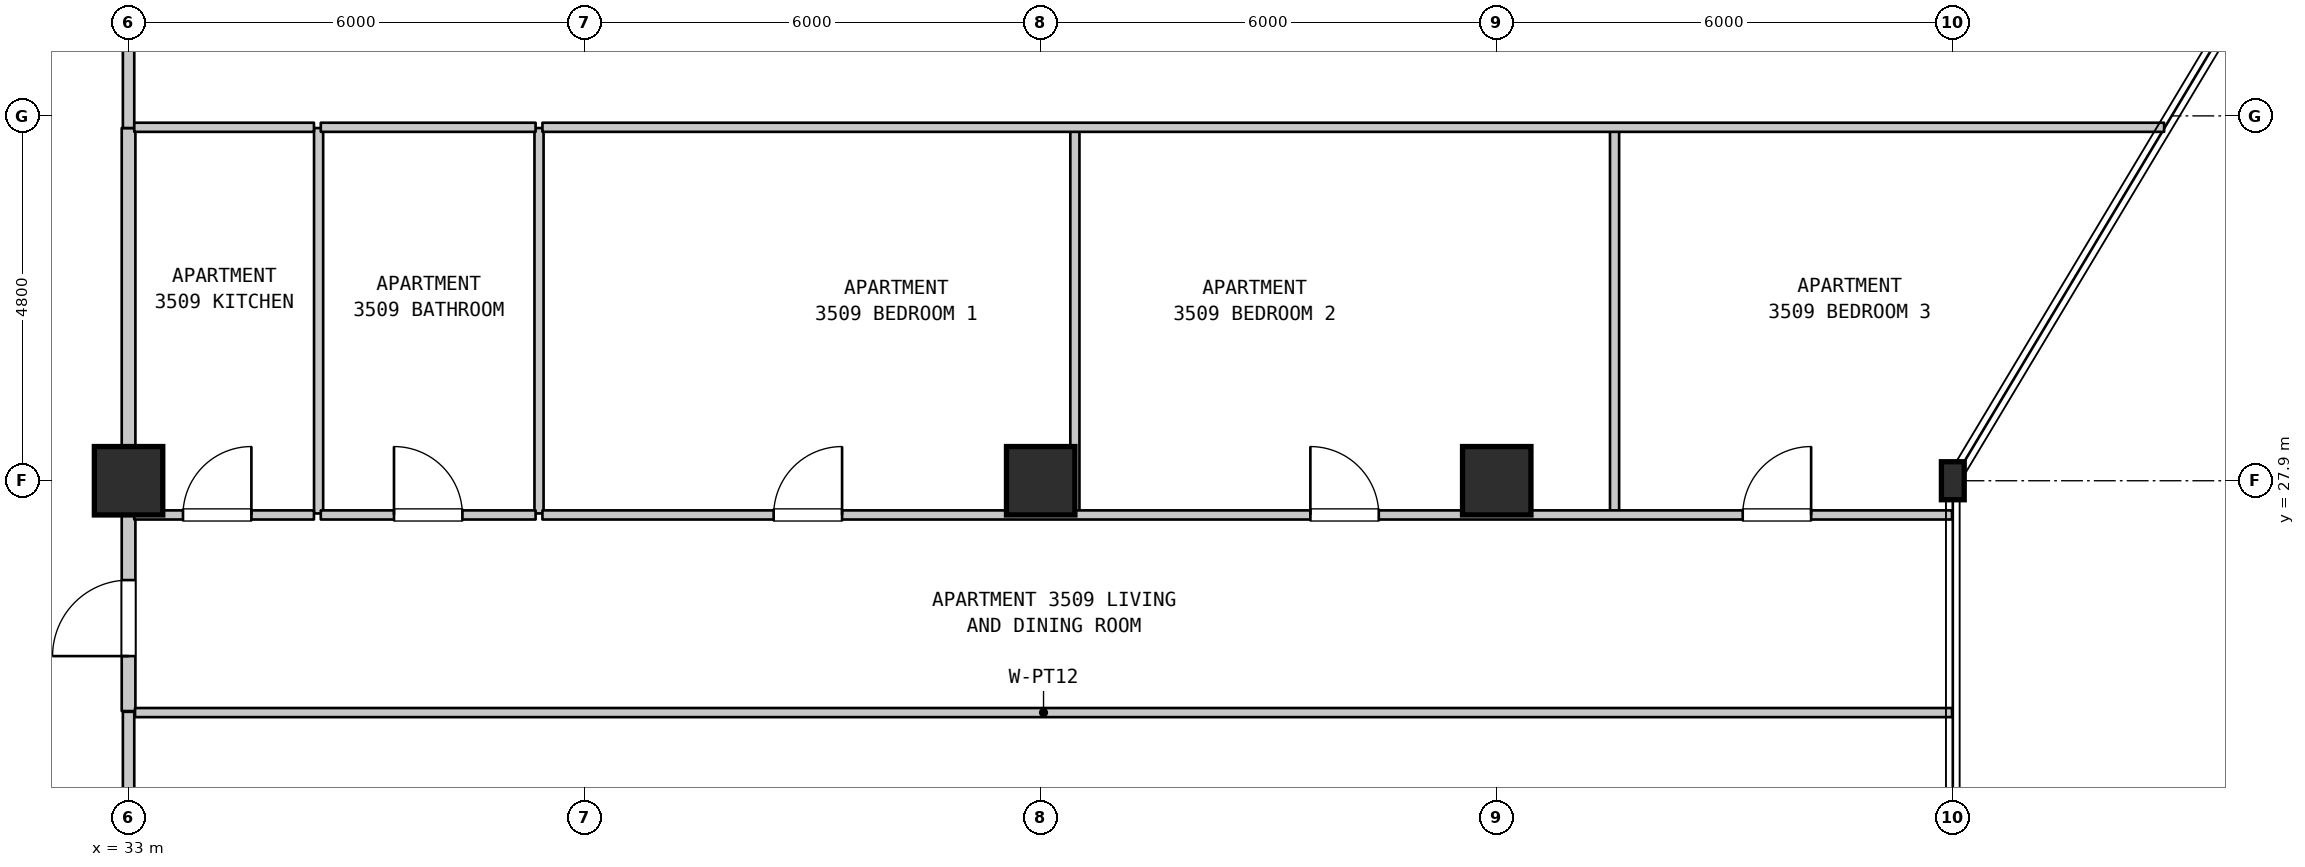
"""IFC4 building model, lengths in metres.
Left out: names, types, materials, properties, quantities, classifications, styles, units other than length and angle.
Written with IfcOpenShell. Run it as: python <this file> out.ifc"""

import sys

from ifc_helpers import new_model, si_unit, direction, frame, frame_2d, origin, origin_2d, place, context, subcontext, project, spatial, rectangle, i_section, extrude, element, fill, save


model = new_model("IFC4")
c1 = context("Model", 3, precision=1e-05, world=origin(), true_north=direction((0.0, 1.0)))
c2 = subcontext(c1, "Body", "Model", "MODEL_VIEW")
j1 = project(units=[si_unit("LENGTHUNIT", "METRE"), si_unit("PLANEANGLEUNIT", "RADIAN")], contexts=[c1])
p1 = place(None, origin())
s1 = spatial("IfcSite", under=j1, at=p1, CompositionType="ELEMENT")
p2 = place(p1, origin())
s2 = spatial("IfcBuilding", under=s1, at=p2, CompositionType="ELEMENT")
p3 = place(p2, frame((0.0, 0.0, 144.6)))
s3 = spatial("IfcBuildingStorey", under=s2, at=p3, CompositionType="ELEMENT", Elevation=144.6)
for number, where, z_axis, x_axis in (
    (1, (33.0, 27.9, 0.0), (0.0, 0.0, 1.0), (1.0, 0.0, 0.0)),
    (2, (45.0, 27.9, 0.0), (0.0, 0.0, 1.0), (1.0, 0.0, 0.0)),
    (3, (51.0, 27.9, 0.0), (0.0, 0.0, 1.0), (1.0, 0.0, 0.0)),
):
    element("IfcColumn", number, at=place(p3, frame(where, z_axis=z_axis, x_axis=x_axis)), inside=s3, PredefinedType="COLUMN", context=c2, shape_type="SweptSolid", body=[
        extrude(rectangle(XDim=0.9, YDim=0.9, at=origin_2d()), origin(), (0.0, 0.0, 1.0), 3.7),
    ])
p4 = place(p3, frame((57.0, 27.9, 0.0), z_axis=(0.0, 0.0, 1.0), x_axis=(1.0, 0.0, 0.0)))
e4 = element("IfcColumn", 4, at=p4, inside=s3, PredefinedType="COLUMN", context=c2, shape_type="SweptSolid", body=[
    extrude(i_section(OverallWidth=0.3, OverallDepth=0.5, WebThickness=0.014, FlangeThickness=0.028, FilletRadius=0.027, at=origin_2d()), origin(), (0.0, 0.0, 1.0), 3.7),
])
p5 = place(p3, frame((33.0, 19.51, 0.0), z_axis=(0.0, 0.0, 1.0), x_axis=(0.0, 1.0, 0.0)))
e5 = element("IfcWall", 5, at=p5, inside=s3, PredefinedType="STANDARD", context=c2, shape_type="SweptSolid", body=[
    extrude(rectangle(XDim=5.35, YDim=0.15, at=frame_2d((2.675, 0.0))), origin(), (0.0, 0.0, 1.0), 2.935),
])
p6 = place(p5, frame((1.534, 0.0, 0.0)))
e6 = element("IfcOpeningElement", 6, at=p6, cuts=e5, PredefinedType="OPENING", context=c2, shape_type="SweptSolid", body=[
    extrude(rectangle(XDim=1.0, YDim=2.15, at=frame_2d((0.5, 1.075))), frame((0.0, 0.085, 0.0), z_axis=(0.0, -1.0, 0.0), x_axis=(1.0, 0.0, 0.0)), (0.0, 0.0, 1.0), 0.17),
])
p7 = place(p3, frame((33.0, 24.87, 0.0), z_axis=(0.0, 0.0, 1.0), x_axis=(0.0, 1.0, 0.0)))
e7 = element("IfcWall", 7, at=p7, inside=s3, PredefinedType="STANDARD", context=c2, shape_type="SweptSolid", body=[
    extrude(rectangle(XDim=2.6, YDim=0.18, at=frame_2d((1.3, 0.0))), origin(), (0.0, 0.0, 1.0), 2.935),
])
p8 = place(p7, frame((0.723, 0.0, 0.0)))
e8 = element("IfcOpeningElement", 8, at=p8, cuts=e7, PredefinedType="OPENING", context=c2, shape_type="SweptSolid", body=[
    extrude(rectangle(XDim=1.0, YDim=2.15, at=frame_2d((0.5, 1.075))), frame((0.0, 0.1, 0.0), z_axis=(0.0, -1.0, 0.0), x_axis=(1.0, 0.0, 0.0)), (0.0, 0.0, 1.0), 0.2),
])
p9 = place(p3, frame((33.0, 27.47, 0.0), z_axis=(0.0, 0.0, 1.0), x_axis=(0.0, 1.0, 0.0)))
e9 = element("IfcWall", 9, at=p9, inside=s3, PredefinedType="STANDARD", context=c2, shape_type="SweptSolid", body=[
    extrude(rectangle(XDim=5.07, YDim=0.18, at=frame_2d((2.535, 0.0))), origin(), (0.0, 0.0, 1.0), 2.885),
])
p10 = place(p3, frame((33.0, 32.54, 0.0), z_axis=(0.0, 0.0, 1.0), x_axis=(0.0, 1.0, 0.0)))
e10 = element("IfcWall", 10, at=p10, inside=s3, PredefinedType="STANDARD", context=c2, shape_type="SweptSolid", body=[
    extrude(rectangle(XDim=5.36, YDim=0.15, at=frame_2d((2.68, 0.0))), origin(), (0.0, 0.0, 1.0), 2.885),
])
p11 = place(p10, frame((2.109, 0.0, 0.0)))
e11 = element("IfcOpeningElement", 11, at=p11, cuts=e10, PredefinedType="OPENING", context=c2, shape_type="SweptSolid", body=[
    extrude(rectangle(XDim=1.0, YDim=2.15, at=frame_2d((0.5, 1.075))), frame((0.0, 0.085, 0.0), z_axis=(0.0, -1.0, 0.0), x_axis=(1.0, 0.0, 0.0)), (0.0, 0.0, 1.0), 0.17),
])
for number, where, z_axis, x_axis in (
    (12, (35.5, 27.47, 0.0), (0.0, 0.0, 1.0), (0.0, 1.0, 0.0)),
    (13, (38.4, 27.47, 0.0), (0.0, 0.0, 1.0), (0.0, 1.0, 0.0)),
    (14, (45.45, 27.47, 0.0), (0.0, 0.0, 1.0), (0.0, 1.0, 0.0)),
    (15, (52.55, 27.47, 0.0), (0.0, 0.0, 1.0), (0.0, 1.0, 0.0)),
):
    element("IfcWall", number, at=place(p3, frame(where, z_axis=z_axis, x_axis=x_axis)), inside=s3, PredefinedType="PARTITIONING", context=c2, shape_type="SweptSolid", body=[
        extrude(rectangle(XDim=5.07, YDim=0.12, at=frame_2d((2.535, 0.0))), origin(), (0.0, 0.0, 1.0), 3.385),
    ])
p12 = place(p3, frame((33.085, 24.85, 0.0), z_axis=(0.0, 0.0, 1.0), x_axis=(1.0, 0.0, 0.0)))
e16 = element("IfcWall", 16, at=p12, inside=s3, PredefinedType="PARTITIONING", context=c2, shape_type="SweptSolid", body=[
    extrude(rectangle(XDim=23.905, YDim=0.12, at=frame_2d((11.953, 0.0))), origin(), (0.0, 0.0, 1.0), 3.385),
])
p13 = place(p3, frame((33.075, 27.45, 0.0), z_axis=(0.0, 0.0, 1.0), x_axis=(1.0, 0.0, 0.0)))
e17 = element("IfcWall", 17, at=p13, inside=s3, PredefinedType="PARTITIONING", context=c2, shape_type="SweptSolid", body=[
    extrude(rectangle(XDim=2.364, YDim=0.12, at=frame_2d((1.182, 0.0))), origin(), (0.0, 0.0, 1.0), 3.385),
])
p14 = place(p13, frame((0.641, 0.0, 0.0)))
e18 = element("IfcOpeningElement", 18, at=p14, cuts=e17, PredefinedType="OPENING", context=c2, shape_type="SweptSolid", body=[
    extrude(rectangle(XDim=0.9, YDim=2.15, at=frame_2d((0.45, 1.075))), frame((0.0, 0.07, 0.0), z_axis=(0.0, -1.0, 0.0), x_axis=(1.0, 0.0, 0.0)), (0.0, 0.0, 1.0), 0.14),
])
p15 = place(p3, frame((35.529, 27.45, 0.0), z_axis=(0.0, 0.0, 1.0), x_axis=(1.0, 0.0, 0.0)))
e19 = element("IfcWall", 19, at=p15, inside=s3, PredefinedType="PARTITIONING", context=c2, shape_type="SweptSolid", body=[
    extrude(rectangle(XDim=2.826, YDim=0.12, at=frame_2d((1.413, 0.0))), origin(), (0.0, 0.0, 1.0), 3.385),
])
p16 = place(p15, frame((0.963, 0.0, 0.0)))
e20 = element("IfcOpeningElement", 20, at=p16, cuts=e19, PredefinedType="OPENING", context=c2, shape_type="SweptSolid", body=[
    extrude(rectangle(XDim=0.9, YDim=2.1, at=frame_2d((0.45, 1.05))), frame((0.0, 0.07, 0.0), z_axis=(0.0, -1.0, 0.0), x_axis=(1.0, 0.0, 0.0)), (0.0, 0.0, 1.0), 0.14),
])
p17 = place(p3, frame((38.445, 27.45, 0.0), z_axis=(0.0, 0.0, 1.0), x_axis=(1.0, 0.0, 0.0)))
e21 = element("IfcWall", 21, at=p17, inside=s3, PredefinedType="PARTITIONING", context=c2, shape_type="SweptSolid", body=[
    extrude(rectangle(XDim=18.545, YDim=0.12, at=frame_2d((9.272, 0.0))), origin(), (0.0, 0.0, 1.0), 3.385),
])
p18 = place(p17, frame((3.042, 0.0, 0.0)))
e22 = element("IfcOpeningElement", 22, at=p18, cuts=e21, PredefinedType="OPENING", context=c2, shape_type="SweptSolid", body=[
    extrude(rectangle(XDim=0.9, YDim=2.15, at=frame_2d((0.45, 1.075))), frame((0.0, 0.07, 0.0), z_axis=(0.0, -1.0, 0.0), x_axis=(1.0, 0.0, 0.0)), (0.0, 0.0, 1.0), 0.14),
])
p19 = place(p17, frame((10.103, 0.0, 0.0)))
e23 = element("IfcOpeningElement", 23, at=p19, cuts=e21, PredefinedType="OPENING", context=c2, shape_type="SweptSolid", body=[
    extrude(rectangle(XDim=0.9, YDim=2.15, at=frame_2d((0.45, 1.075))), frame((0.0, 0.07, 0.0), z_axis=(0.0, -1.0, 0.0), x_axis=(1.0, 0.0, 0.0)), (0.0, 0.0, 1.0), 0.14),
])
p20 = place(p17, frame((15.791, 0.0, 0.0)))
e24 = element("IfcOpeningElement", 24, at=p20, cuts=e21, PredefinedType="OPENING", context=c2, shape_type="SweptSolid", body=[
    extrude(rectangle(XDim=0.9, YDim=2.15, at=frame_2d((0.45, 1.075))), frame((0.0, 0.07, 0.0), z_axis=(0.0, -1.0, 0.0), x_axis=(1.0, 0.0, 0.0)), (0.0, 0.0, 1.0), 0.14),
])
p21 = place(p3, frame((33.075, 32.55, 0.0), z_axis=(0.0, 0.0, 1.0), x_axis=(1.0, 0.0, 0.0)))
e25 = element("IfcWall", 25, at=p21, inside=s3, PredefinedType="PARTITIONING", context=c2, shape_type="SweptSolid", body=[
    extrude(rectangle(XDim=2.364, YDim=0.12, at=frame_2d((1.182, 0.0))), origin(), (0.0, 0.0, 1.0), 3.385),
])
p22 = place(p3, frame((35.529, 32.55, 0.0), z_axis=(0.0, 0.0, 1.0), x_axis=(1.0, 0.0, 0.0)))
e26 = element("IfcWall", 26, at=p22, inside=s3, PredefinedType="PARTITIONING", context=c2, shape_type="SweptSolid", body=[
    extrude(rectangle(XDim=2.826, YDim=0.12, at=frame_2d((1.413, 0.0))), origin(), (0.0, 0.0, 1.0), 3.385),
])
p23 = place(p3, frame((38.445, 32.55, 0.0), z_axis=(0.0, 0.0, 1.0), x_axis=(1.0, 0.0, 0.0)))
e27 = element("IfcWall", 27, at=p23, inside=s3, PredefinedType="PARTITIONING", context=c2, shape_type="SweptSolid", body=[
    extrude(rectangle(XDim=21.335, YDim=0.12, at=frame_2d((10.667, 0.0))), origin(), (0.0, 0.0, 1.0), 3.385),
])
p24 = place(p8, origin())
e28 = element("IfcDoor", 28, at=p24, inside=s3, OperationType="SINGLE_SWING_LEFT", PredefinedType="DOOR", context=c2, shape_type="SweptSolid", body=[
    extrude(rectangle(XDim=1.0, YDim=2.15, at=frame_2d((0.5, 1.075))), frame((0.0, 0.025, 0.0), z_axis=(0.0, -1.0, 0.0), x_axis=(1.0, 0.0, 0.0)), (0.0, 0.0, 1.0), 0.05),
])
fill(e8, e28)
p25 = place(p14, origin())
e29 = element("IfcDoor", 29, at=p25, inside=s3, OperationType="SINGLE_SWING_RIGHT", PredefinedType="DOOR", context=c2, shape_type="SweptSolid", body=[
    extrude(rectangle(XDim=0.9, YDim=2.15, at=frame_2d((0.45, 1.075))), frame((0.0, 0.025, 0.0), z_axis=(0.0, -1.0, 0.0), x_axis=(1.0, 0.0, 0.0)), (0.0, 0.0, 1.0), 0.05),
])
fill(e18, e29)
p26 = place(p16, origin())
e30 = element("IfcDoor", 30, at=p26, inside=s3, OperationType="SINGLE_SWING_LEFT", PredefinedType="DOOR", context=c2, shape_type="SweptSolid", body=[
    extrude(rectangle(XDim=0.9, YDim=2.1, at=frame_2d((0.45, 1.05))), frame((0.0, 0.025, 0.0), z_axis=(0.0, -1.0, 0.0), x_axis=(1.0, 0.0, 0.0)), (0.0, 0.0, 1.0), 0.05),
])
fill(e20, e30)
p27 = place(p18, origin())
e31 = element("IfcDoor", 31, at=p27, inside=s3, OperationType="SINGLE_SWING_RIGHT", PredefinedType="DOOR", context=c2, shape_type="SweptSolid", body=[
    extrude(rectangle(XDim=0.9, YDim=2.15, at=frame_2d((0.45, 1.075))), frame((0.0, 0.025, 0.0), z_axis=(0.0, -1.0, 0.0), x_axis=(1.0, 0.0, 0.0)), (0.0, 0.0, 1.0), 0.05),
])
fill(e22, e31)
p28 = place(p19, origin())
e32 = element("IfcDoor", 32, at=p28, inside=s3, OperationType="SINGLE_SWING_LEFT", PredefinedType="DOOR", context=c2, shape_type="SweptSolid", body=[
    extrude(rectangle(XDim=0.9, YDim=2.15, at=frame_2d((0.45, 1.075))), frame((0.0, 0.025, 0.0), z_axis=(0.0, -1.0, 0.0), x_axis=(1.0, 0.0, 0.0)), (0.0, 0.0, 1.0), 0.05),
])
fill(e23, e32)
p29 = place(p20, origin())
e33 = element("IfcDoor", 33, at=p29, inside=s3, OperationType="SINGLE_SWING_RIGHT", PredefinedType="DOOR", context=c2, shape_type="SweptSolid", body=[
    extrude(rectangle(XDim=0.9, YDim=2.15, at=frame_2d((0.45, 1.075))), frame((0.0, 0.025, 0.0), z_axis=(0.0, -1.0, 0.0), x_axis=(1.0, 0.0, 0.0)), (0.0, 0.0, 1.0), 0.05),
])
fill(e24, e33)
save(model, sys.argv[1])
